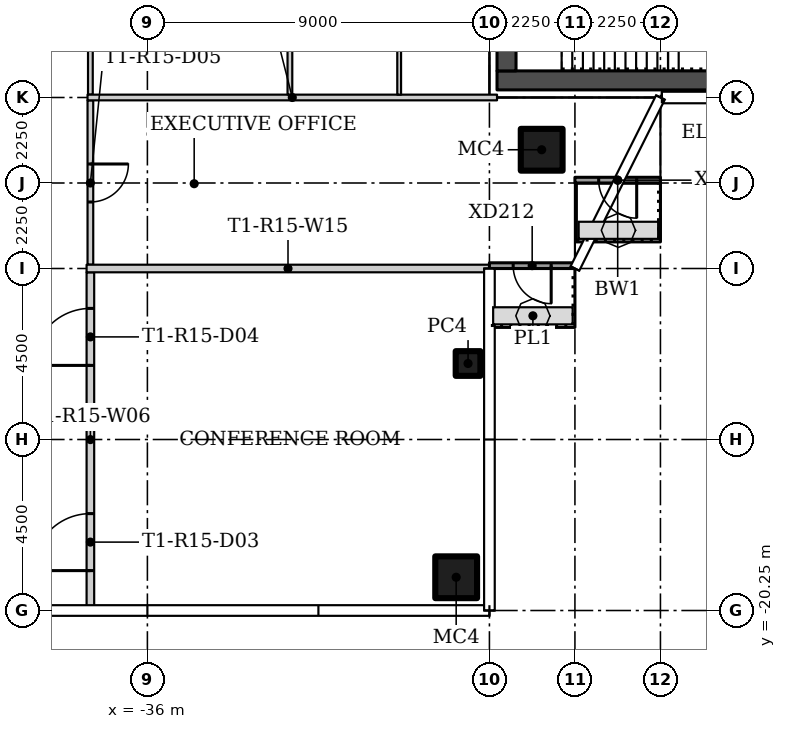
"""IFC4 building model, lengths in metres.
Left out: names, types, materials, properties, quantities, classifications, styles, units other than length and angle.
Written with IfcOpenShell. Run it as: python <this file> out.ifc"""

import sys

from ifc_helpers import new_model, si_unit, direction, frame, frame_2d, origin, origin_2d, place, context, subcontext, project, spatial, rectangle, hollow_rectangle, extrude, element, fill, save


model = new_model("IFC4")
c1 = context("Model", 3, precision=1e-05, world=origin(), true_north=direction((0.0, 1.0)))
c2 = subcontext(c1, "Body", "Model", "MODEL_VIEW")
j1 = project(units=[si_unit("LENGTHUNIT", "METRE"), si_unit("PLANEANGLEUNIT", "RADIAN")], contexts=[c1])
p1 = place(None, origin())
s1 = spatial("IfcSite", under=j1, at=p1, CompositionType="ELEMENT")
p2 = place(p1, origin())
s2 = spatial("IfcBuilding", under=s1, at=p2, CompositionType="ELEMENT")
p3 = place(p2, frame((0.0, 0.0, 142.8)))
s3 = spatial("IfcBuildingStorey", under=s2, at=p3, CompositionType="ELEMENT", Elevation=142.8)
p4 = place(p3, frame((-25.625, -8.125, 0.0)))
e1 = element("IfcColumn", 1, at=p4, inside=s3, PredefinedType="COLUMN", context=c2, shape_type="SweptSolid", body=[
    extrude(hollow_rectangle(XDim=1.1, YDim=1.1, WallThickness=0.04, at=origin_2d()), origin(), (0.0, 0.0, 1.0), 3.55),
])
p5 = place(p3, frame((-27.562, -13.75, 0.0)))
e2 = element("IfcColumn", 2, at=p5, inside=s3, PredefinedType="COLUMN", context=c2, shape_type="SweptSolid", body=[
    extrude(hollow_rectangle(XDim=0.65, YDim=0.65, WallThickness=0.02, at=origin_2d()), origin(), (0.0, 0.0, 1.0), 3.55),
])
p6 = place(p3, frame((-27.875, -19.375, 0.0)))
e3 = element("IfcColumn", 3, at=p6, inside=s3, PredefinedType="COLUMN", context=c2, shape_type="SweptSolid", body=[
    extrude(hollow_rectangle(XDim=1.1, YDim=1.1, WallThickness=0.04, at=origin_2d()), origin(), (0.0, 0.0, 1.0), 3.55),
])
p7 = place(p3, frame((-37.5, -6.825, 0.0), z_axis=(0.0, 0.0, 1.0), x_axis=(0.0, -1.0, 0.0)))
e4 = element("IfcWall", 4, at=p7, inside=s3, PredefinedType="PARTITIONING", context=c2, shape_type="SweptSolid", body=[
    extrude(rectangle(XDim=4.325, YDim=0.15, at=frame_2d((2.163, 0.0))), origin(), (0.0, 0.0, 1.0), 3.55),
])
p8 = place(p7, frame((1.675, 0.0, 0.0)))
e5 = element("IfcOpeningElement", 5, at=p8, cuts=e4, PredefinedType="OPENING", context=c2, shape_type="SweptSolid", body=[
    extrude(rectangle(XDim=1.0, YDim=2.4, at=frame_2d((0.5, 1.2))), frame((0.0, 0.085, 0.0), z_axis=(0.0, -1.0, 0.0), x_axis=(1.0, 0.0, 0.0)), (0.0, 0.0, 1.0), 0.17),
])
p9 = place(p3, frame((-37.5, -20.155, 0.0), z_axis=(0.0, 0.0, 1.0), x_axis=(0.0, 1.0, 0.0)))
e6 = element("IfcWall", 6, at=p9, inside=s3, PredefinedType="PARTITIONING", context=c2, shape_type="SweptSolid", body=[
    extrude(rectangle(XDim=8.805, YDim=0.2, at=frame_2d((4.402, 0.0))), origin(), (0.0, 0.0, 1.0), 3.55),
])
p10 = place(p9, frame((0.955, 0.0, 0.0)))
e7 = element("IfcOpeningElement", 7, at=p10, cuts=e6, PredefinedType="OPENING", context=c2, shape_type="SweptSolid", body=[
    extrude(rectangle(XDim=1.5, YDim=2.4, at=frame_2d((0.75, 1.2))), frame((0.0, 0.11, 0.0), z_axis=(0.0, -1.0, 0.0), x_axis=(1.0, 0.0, 0.0)), (0.0, 0.0, 1.0), 0.22),
])
p11 = place(p9, frame((6.355, 0.0, 0.0)))
e8 = element("IfcOpeningElement", 8, at=p11, cuts=e6, PredefinedType="OPENING", context=c2, shape_type="SweptSolid", body=[
    extrude(rectangle(XDim=1.5, YDim=2.4, at=frame_2d((0.75, 1.2))), frame((0.0, 0.11, 0.0), z_axis=(0.0, -1.0, 0.0), x_axis=(1.0, 0.0, 0.0)), (0.0, 0.0, 1.0), 0.22),
])
p12 = place(p3, frame((-37.5, -0.013, 0.0), z_axis=(0.0, 0.0, 1.0), x_axis=(0.0, -1.0, 0.0)))
e9 = element("IfcWall", 9, at=p12, inside=s3, PredefinedType="PARTITIONING", context=c2, shape_type="SweptSolid", body=[
    extrude(rectangle(XDim=6.662, YDim=0.125, at=frame_2d((3.331, 0.0))), origin(), (0.0, 0.0, 1.0), 3.55),
])
p13 = place(p12, frame((2.887, 0.0, 0.0)))
e10 = element("IfcOpeningElement", 10, at=p13, cuts=e9, PredefinedType="OPENING", context=c2, shape_type="SweptSolid", body=[
    extrude(rectangle(XDim=0.9, YDim=2.1, at=frame_2d((0.45, 1.05))), frame((0.0, 0.073, 0.0), z_axis=(0.0, -1.0, 0.0), x_axis=(1.0, 0.0, 0.0)), (0.0, 0.0, 1.0), 0.145),
])
p14 = place(p3, frame((-37.6, -11.25, 0.0)))
e11 = element("IfcWall", 11, at=p14, inside=s3, PredefinedType="PARTITIONING", context=c2, shape_type="SweptSolid", body=[
    extrude(rectangle(XDim=10.6, YDim=0.2, at=frame_2d((5.3, 0.0))), origin(), (0.0, 0.0, 1.0), 3.55),
])
p15 = place(p3, frame((-26.8, -6.75, 0.0), z_axis=(0.0, 0.0, 1.0), x_axis=(-1.0, 0.0, 0.0)))
e12 = element("IfcWall", 12, at=p15, inside=s3, PredefinedType="PARTITIONING", context=c2, shape_type="SweptSolid", body=[
    extrude(rectangle(XDim=10.775, YDim=0.15, at=frame_2d((5.387, 0.0))), origin(), (0.0, 0.0, 1.0), 3.55),
])
p16 = place(p3, frame((-32.25, -6.675, 0.0), z_axis=(0.0, 0.0, 1.0), x_axis=(0.0, 1.0, 0.0)))
e13 = element("IfcWall", 13, at=p16, inside=s3, PredefinedType="PARTITIONING", context=c2, shape_type="SweptSolid", body=[
    extrude(rectangle(XDim=6.662, YDim=0.125, at=frame_2d((3.331, 0.0))), origin(), (0.0, 0.0, 1.0), 3.55),
])
p17 = place(p3, frame((-29.375, -6.675, 0.0), z_axis=(0.0, 0.0, 1.0), x_axis=(0.0, 1.0, 0.0)))
e14 = element("IfcWall", 14, at=p17, inside=s3, PredefinedType="PARTITIONING", context=c2, shape_type="SweptSolid", body=[
    extrude(rectangle(XDim=6.675, YDim=0.1, at=frame_2d((3.337, 0.0))), origin(), (0.0, 0.0, 1.0), 3.55),
])
p18 = place(p3, frame((-22.5, -8.925, 0.0), z_axis=(0.0, 0.0, 1.0), x_axis=(-1.0, 0.0, 0.0)))
e15 = element("IfcWall", 15, at=p18, inside=s3, PredefinedType="SOLIDWALL", context=c2, shape_type="SweptSolid", body=[
    extrude(rectangle(XDim=2.25, YDim=0.15, at=frame_2d((1.125, 0.0))), origin(), (0.0, 0.0, 1.0), 3.45),
])
p19 = place(p18, frame((0.625, 0.0, 0.0)))
e16 = element("IfcOpeningElement", 16, at=p19, cuts=e15, PredefinedType="OPENING", context=c2, shape_type="SweptSolid", body=[
    extrude(rectangle(XDim=1.0, YDim=2.4, at=frame_2d((0.5, 1.2))), frame((0.0, 0.085, 0.0), z_axis=(0.0, -1.0, 0.0), x_axis=(1.0, 0.0, 0.0)), (0.0, 0.0, 1.0), 0.17),
])
p20 = place(p3, frame((-24.75, -11.175, 0.0), z_axis=(0.0, 0.0, 1.0), x_axis=(-1.0, 0.0, 0.0)))
e17 = element("IfcWall", 17, at=p20, inside=s3, PredefinedType="SOLIDWALL", context=c2, shape_type="SweptSolid", body=[
    extrude(rectangle(XDim=2.25, YDim=0.15, at=frame_2d((1.125, 0.0))), origin(), (0.0, 0.0, 1.0), 3.45),
])
p21 = place(p20, frame((0.625, 0.0, 0.0)))
e18 = element("IfcOpeningElement", 18, at=p21, cuts=e17, PredefinedType="OPENING", context=c2, shape_type="SweptSolid", body=[
    extrude(rectangle(XDim=1.0, YDim=2.4, at=frame_2d((0.5, 1.2))), frame((0.0, 0.085, 0.0), z_axis=(0.0, -1.0, 0.0), x_axis=(1.0, 0.0, 0.0)), (0.0, 0.0, 1.0), 0.17),
])
p22 = place(p3, frame((-26.8, -6.3, 0.0)))
e19 = element("IfcWall", 19, at=p22, inside=s3, PredefinedType="SHEAR", context=c2, shape_type="SweptSolid", body=[
    extrude(rectangle(XDim=13.1, YDim=0.5, at=frame_2d((6.55, 0.0))), origin(), (0.0, 0.0, 1.0), 3.55),
])
p23 = place(p3, frame((-26.55, 6.05, 0.0), z_axis=(0.0, 0.0, 1.0), x_axis=(0.0, -1.0, 0.0)))
e20 = element("IfcWall", 20, at=p23, inside=s3, PredefinedType="SHEAR", context=c2, shape_type="SweptSolid", body=[
    extrude(rectangle(XDim=12.1, YDim=0.5, at=frame_2d((6.05, 0.0))), origin(), (0.0, 0.0, 1.0), 3.55),
])
p24 = place(p23, frame((3.9, 0.0, 0.0)))
e21 = element("IfcOpeningElement", 21, at=p24, cuts=e20, PredefinedType="OPENING", context=c2, shape_type="SweptSolid", body=[
    extrude(rectangle(XDim=1.8, YDim=2.4, at=frame_2d((0.9, 1.2))), frame((0.0, 0.26, 0.0), z_axis=(0.0, -1.0, 0.0), x_axis=(1.0, 0.0, 0.0)), (0.0, 0.0, 1.0), 0.52),
])
p25 = place(p10, origin())
e22 = element("IfcDoor", 22, at=p25, inside=s3, OperationType="DOUBLE_DOOR_SINGLE_SWING", PredefinedType="DOOR", context=c2, shape_type="SweptSolid", body=[
    extrude(rectangle(XDim=1.5, YDim=2.4, at=frame_2d((0.75, 1.2))), frame((0.0, 0.025, 0.0), z_axis=(0.0, -1.0, 0.0), x_axis=(1.0, 0.0, 0.0)), (0.0, 0.0, 1.0), 0.05),
])
fill(e7, e22)
p26 = place(p11, origin())
e23 = element("IfcDoor", 23, at=p26, inside=s3, OperationType="DOUBLE_DOOR_SINGLE_SWING", PredefinedType="DOOR", context=c2, shape_type="SweptSolid", body=[
    extrude(rectangle(XDim=1.5, YDim=2.4, at=frame_2d((0.75, 1.2))), frame((0.0, 0.025, 0.0), z_axis=(0.0, -1.0, 0.0), x_axis=(1.0, 0.0, 0.0)), (0.0, 0.0, 1.0), 0.05),
])
fill(e8, e23)
p27 = place(p8, origin())
e24 = element("IfcDoor", 24, at=p27, inside=s3, OperationType="SINGLE_SWING_RIGHT", PredefinedType="DOOR", context=c2, shape_type="SweptSolid", body=[
    extrude(rectangle(XDim=1.0, YDim=2.4, at=frame_2d((0.5, 1.2))), frame((0.0, 0.025, 0.0), z_axis=(0.0, -1.0, 0.0), x_axis=(1.0, 0.0, 0.0)), (0.0, 0.0, 1.0), 0.05),
])
fill(e5, e24)
p28 = place(p19, origin())
e25 = element("IfcDoor", 25, at=p28, inside=s3, OperationType="SINGLE_SWING_RIGHT", PredefinedType="DOOR", context=c2, shape_type="SweptSolid", body=[
    extrude(rectangle(XDim=1.0, YDim=2.4, at=frame_2d((0.5, 1.2))), frame((0.0, 0.025, 0.0), z_axis=(0.0, -1.0, 0.0), x_axis=(1.0, 0.0, 0.0)), (0.0, 0.0, 1.0), 0.05),
])
fill(e16, e25)
p29 = place(p21, origin())
e26 = element("IfcDoor", 26, at=p29, inside=s3, OperationType="SINGLE_SWING_LEFT", PredefinedType="DOOR", context=c2, shape_type="SweptSolid", body=[
    extrude(rectangle(XDim=1.0, YDim=2.4, at=frame_2d((0.5, 1.2))), frame((0.0, 0.025, 0.0), z_axis=(0.0, -1.0, 0.0), x_axis=(1.0, 0.0, 0.0)), (0.0, 0.0, 1.0), 0.05),
])
fill(e18, e26)
save(model, sys.argv[1])
